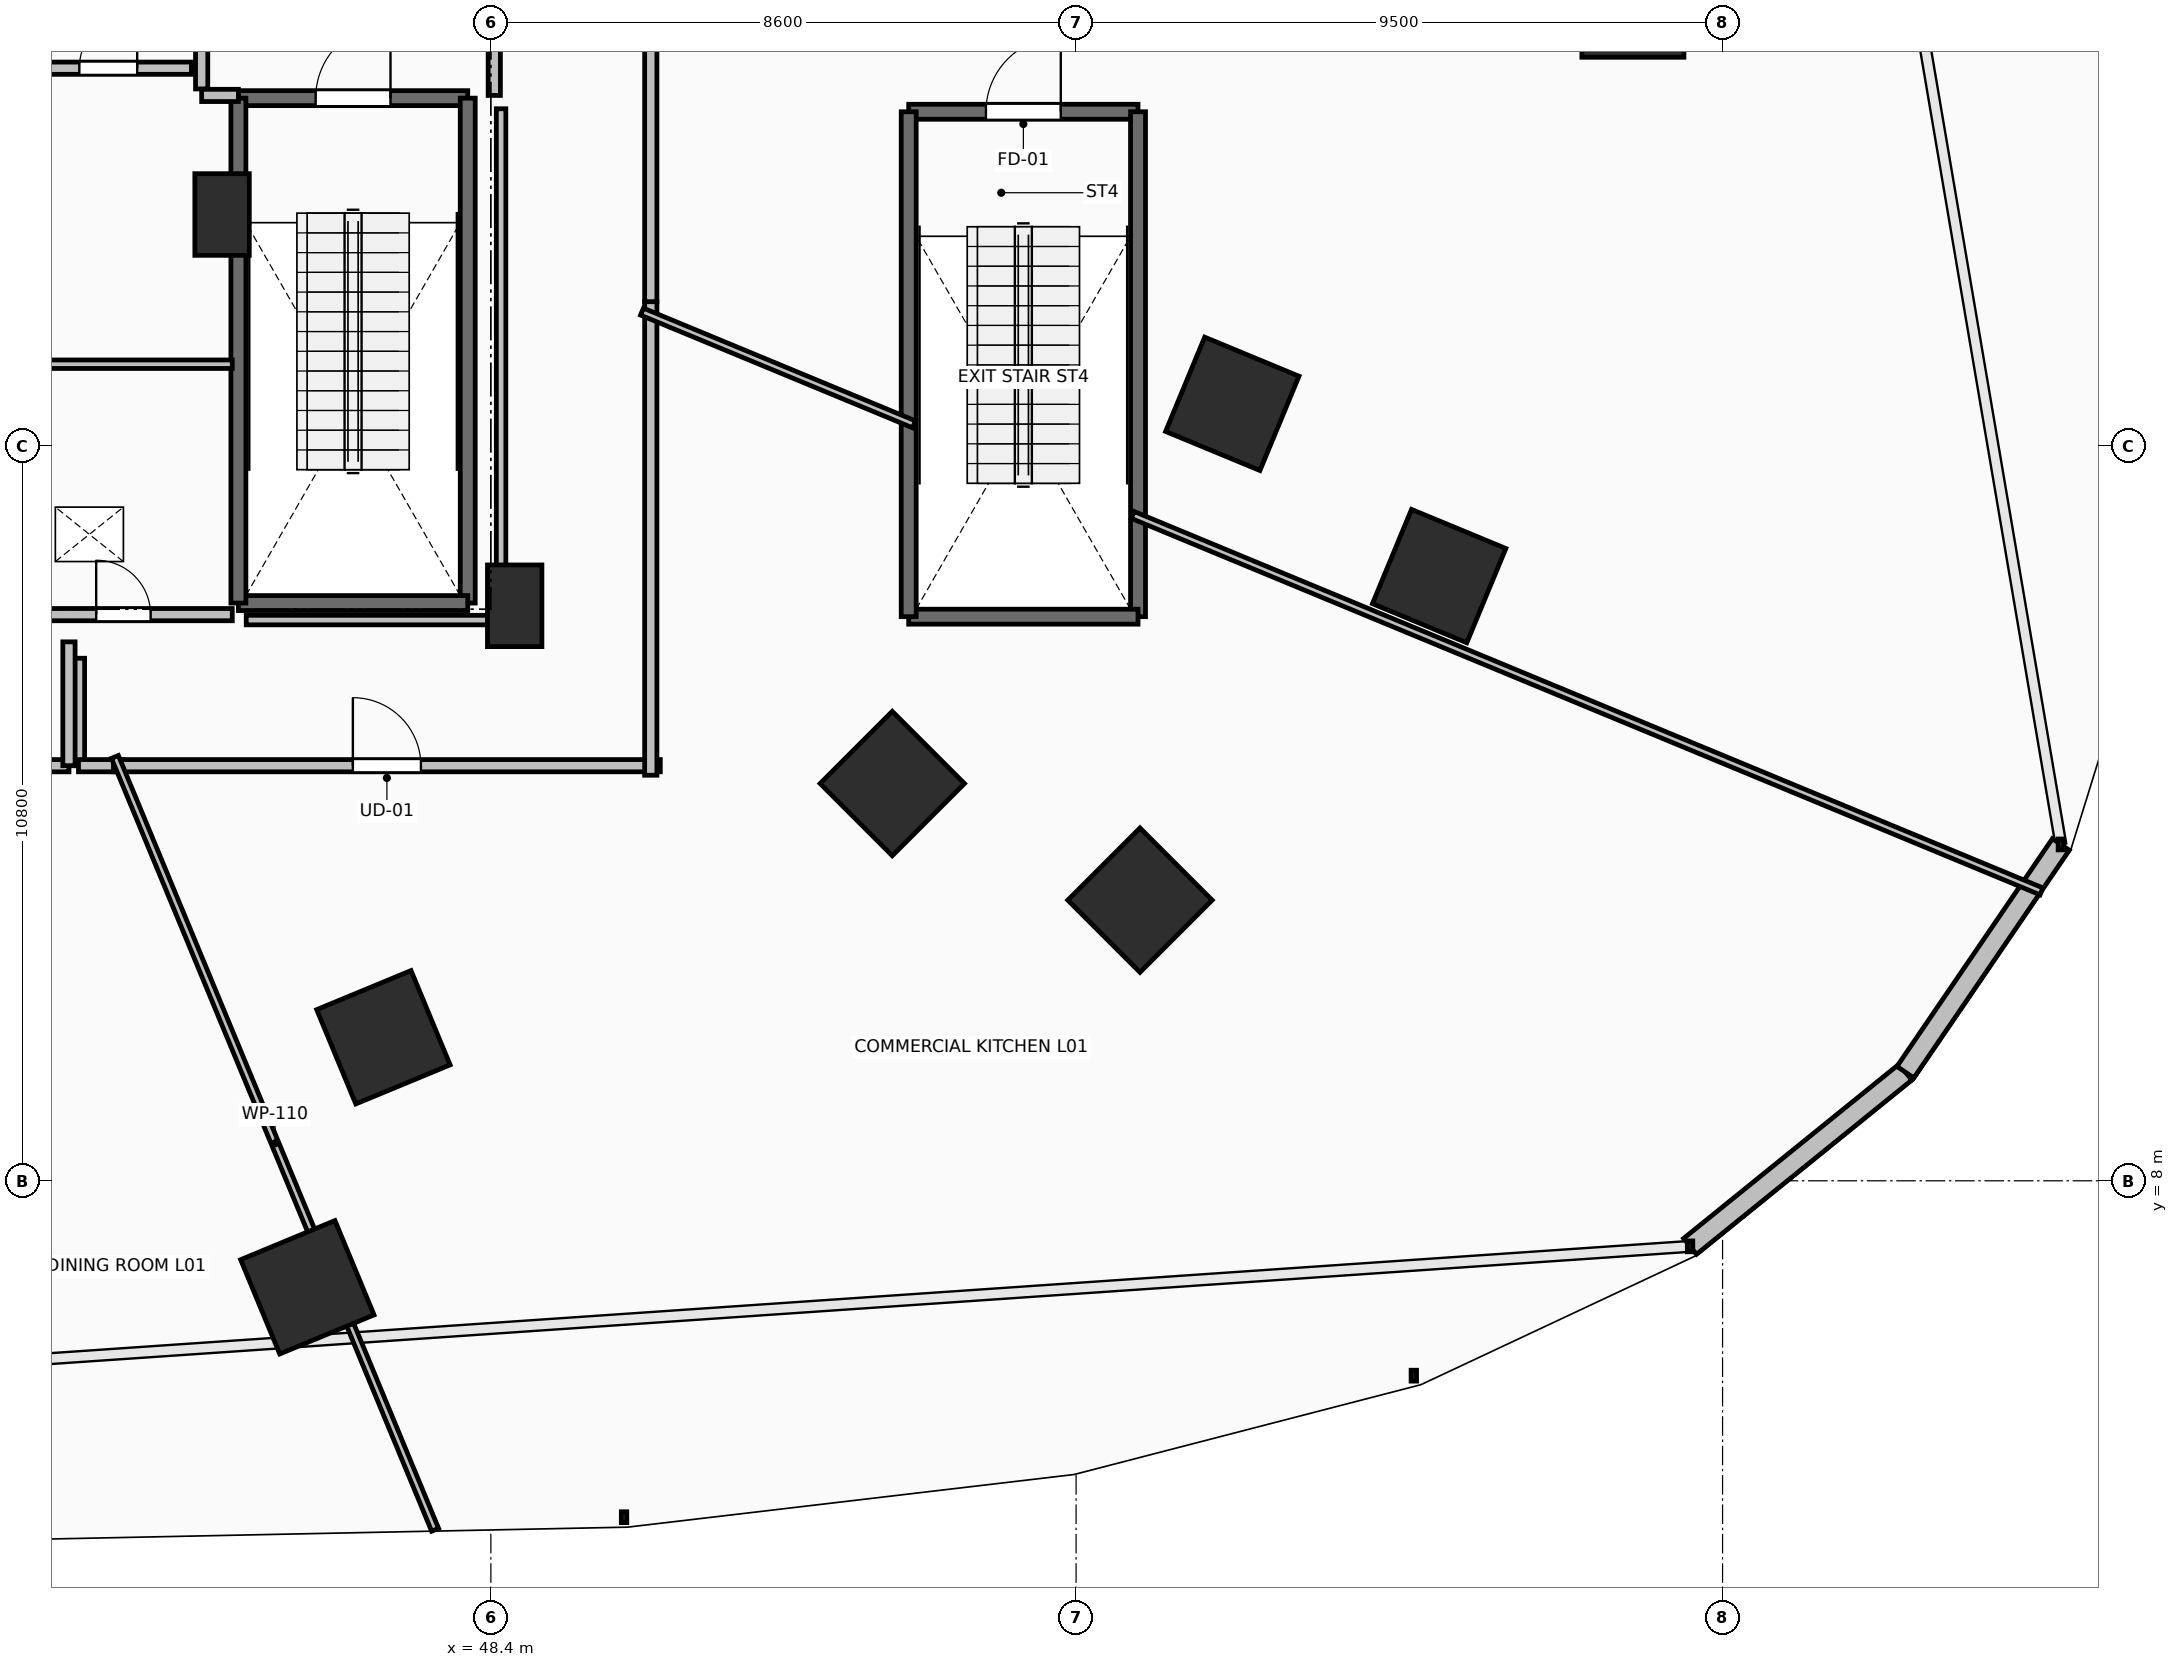
"""IFC4 building model, lengths in metres.
Left out: names, types, materials, properties, quantities, classifications, styles, units other than length and angle.
Written with IfcOpenShell. Run it as: python <this file> out.ifc"""

import sys

from ifc_helpers import new_model, si_unit, direction, frame, frame_2d, origin, origin_2d, place, context, subcontext, project, spatial, rectangle, extrude, element, fill, save


model = new_model("IFC4")
c1 = context("Model", 3, precision=1e-05, world=origin(), true_north=direction((0.0, 1.0)))
c2 = subcontext(c1, "Body", "Model", "MODEL_VIEW")
j1 = project(units=[si_unit("LENGTHUNIT", "METRE"), si_unit("PLANEANGLEUNIT", "RADIAN")], contexts=[c1])
p1 = place(None, origin())
s1 = spatial("IfcSite", under=j1, at=p1, CompositionType="ELEMENT")
p2 = place(p1, origin())
s2 = spatial("IfcBuilding", under=s1, at=p2, CompositionType="ELEMENT")
p3 = place(p2, frame((0.0, 0.0, 4.8)))
s3 = spatial("IfcBuildingStorey", under=s2, at=p3, CompositionType="ELEMENT", Elevation=4.8)
for number, where, z_axis, x_axis in (
    (1, (46.821, 10.109, 0.0), (0.0, 0.0, 1.0), (0.383, -0.924, 0.0)),
    (2, (54.299, 13.838, 0.0), (0.0, 0.0, 1.0), (0.707, -0.707, 0.0)),
    (3, (59.295, 19.418, 0.0), (0.0, 0.0, 1.0), (0.924, -0.383, 0.0)),
    (4, (65.182, 25.261, 0.0), (0.0, 0.0, 1.0), (1.0, 0.0, 0.0)),
    (5, (45.703, 6.435, 0.0), (0.0, 0.0, 1.0), (0.383, -0.924, 0.0)),
    (6, (57.939, 12.124, 0.0), (0.0, 0.0, 1.0), (0.707, -0.707, 0.0)),
    (7, (62.335, 16.886, 0.0), (0.0, 0.0, 1.0), (0.924, -0.383, 0.0)),
):
    element("IfcColumn", number, at=place(p3, frame(where, z_axis=z_axis, x_axis=x_axis)), inside=s3, PredefinedType="COLUMN", context=c2, shape_type="SweptSolid", body=[
        extrude(rectangle(XDim=1.5, YDim=1.5, at=origin_2d()), origin(), (0.0, 0.0, 1.0), 4.8),
    ])
for number, where, z_axis, x_axis in (
    (8, (48.75, 16.45, 0.0), (0.0, 0.0, 1.0), (1.0, 0.0, 0.0)),
    (9, (44.45, 22.2, 0.0), (0.0, 0.0, 1.0), (1.0, 0.0, 0.0)),
):
    element("IfcColumn", number, at=place(p3, frame(where, z_axis=z_axis, x_axis=x_axis)), inside=s3, PredefinedType="PILASTER", context=c2, shape_type="SweptSolid", body=[
        extrude(rectangle(XDim=0.8, YDim=1.2, at=origin_2d()), origin(), (0.0, 0.0, 1.0), 4.8),
    ])
p4 = place(p3, frame((66.022, 7.037, 0.0), z_axis=(0.0, 0.0, 1.0), x_axis=(0.777457154615, 0.628935905111, 0.0)))
e10 = element("IfcWall", 10, at=p4, inside=s3, PredefinedType="STANDARD", context=c2, shape_type="SweptSolid", body=[
    extrude(rectangle(XDim=4.07, YDim=0.3, at=frame_2d((2.035, 0.0))), origin(), (0.0, 0.0, 1.0), 4.48),
])
p5 = place(p3, frame((69.187, 9.596, 0.0), z_axis=(0.0, 0.0, 1.0), x_axis=(0.563802284854, 0.825909791438, 0.0)))
e11 = element("IfcWall", 11, at=p5, inside=s3, PredefinedType="STANDARD", context=c2, shape_type="SweptSolid", body=[
    extrude(rectangle(XDim=4.052, YDim=0.3, at=frame_2d((2.026, 0.0))), origin(), (0.0, 0.0, 1.0), 4.48),
])
p6 = place(p3, frame((44.69, 23.91, 0.0), z_axis=(0.0, 0.0, 1.0), x_axis=(1.0, 0.0, 0.0)))
e12 = element("IfcWall", 12, at=p6, inside=s3, PredefinedType="SOLIDWALL", context=c2, shape_type="SweptSolid", body=[
    extrude(rectangle(XDim=3.37, YDim=0.22, at=frame_2d((1.685, 0.0))), origin(), (0.0, 0.0, 1.0), 4.48),
])
p7 = place(p6, frame((1.135, 0.0, 0.0)))
e13 = element("IfcOpeningElement", 13, at=p7, cuts=e12, PredefinedType="OPENING", context=c2, shape_type="SweptSolid", body=[
    extrude(rectangle(XDim=1.1, YDim=2.15, at=frame_2d((0.55, 1.075))), frame((0.0, 0.125, 0.0), z_axis=(0.0, -1.0, 0.0), x_axis=(1.0, 0.0, 0.0)), (0.0, 0.0, 1.0), 0.25),
])
p8 = place(p3, frame((48.06, 23.91, 0.0), z_axis=(0.0, 0.0, 1.0), x_axis=(0.0, -1.0, 0.0)))
e14 = element("IfcWall", 14, at=p8, inside=s3, PredefinedType="SOLIDWALL", context=c2, shape_type="SweptSolid", body=[
    extrude(rectangle(XDim=7.42, YDim=0.22, at=frame_2d((3.71, 0.0))), origin(), (0.0, 0.0, 1.0), 4.48),
])
p9 = place(p3, frame((48.06, 16.49, 0.0), z_axis=(0.0, 0.0, 1.0), x_axis=(-1.0, 0.0, 0.0)))
e15 = element("IfcWall", 15, at=p9, inside=s3, PredefinedType="SOLIDWALL", context=c2, shape_type="SweptSolid", body=[
    extrude(rectangle(XDim=3.37, YDim=0.22, at=frame_2d((1.685, 0.0))), origin(), (0.0, 0.0, 1.0), 4.48),
])
p10 = place(p3, frame((44.69, 16.49, 0.0), z_axis=(0.0, 0.0, 1.0), x_axis=(0.0, 1.0, 0.0)))
e16 = element("IfcWall", 16, at=p10, inside=s3, PredefinedType="SOLIDWALL", context=c2, shape_type="SweptSolid", body=[
    extrude(rectangle(XDim=7.42, YDim=0.22, at=frame_2d((3.71, 0.0))), origin(), (0.0, 0.0, 1.0), 4.48),
])
p11 = place(p3, frame((54.54, 23.71, 0.0), z_axis=(0.0, 0.0, 1.0), x_axis=(1.0, 0.0, 0.0)))
e17 = element("IfcWall", 17, at=p11, inside=s3, PredefinedType="SOLIDWALL", context=c2, shape_type="SweptSolid", body=[
    extrude(rectangle(XDim=3.37, YDim=0.22, at=frame_2d((1.685, 0.0))), origin(), (0.0, 0.0, 1.0), 4.48),
])
p12 = place(p11, frame((1.135, 0.0, 0.0)))
e18 = element("IfcOpeningElement", 18, at=p12, cuts=e17, PredefinedType="OPENING", context=c2, shape_type="SweptSolid", body=[
    extrude(rectangle(XDim=1.1, YDim=2.15, at=frame_2d((0.55, 1.075))), frame((0.0, 0.125, 0.0), z_axis=(0.0, -1.0, 0.0), x_axis=(1.0, 0.0, 0.0)), (0.0, 0.0, 1.0), 0.25),
])
p13 = place(p3, frame((57.91, 23.71, 0.0), z_axis=(0.0, 0.0, 1.0), x_axis=(0.0, -1.0, 0.0)))
e19 = element("IfcWall", 19, at=p13, inside=s3, PredefinedType="SOLIDWALL", context=c2, shape_type="SweptSolid", body=[
    extrude(rectangle(XDim=7.42, YDim=0.22, at=frame_2d((3.71, 0.0))), origin(), (0.0, 0.0, 1.0), 4.48),
])
p14 = place(p3, frame((57.91, 16.29, 0.0), z_axis=(0.0, 0.0, 1.0), x_axis=(-1.0, 0.0, 0.0)))
e20 = element("IfcWall", 20, at=p14, inside=s3, PredefinedType="SOLIDWALL", context=c2, shape_type="SweptSolid", body=[
    extrude(rectangle(XDim=3.37, YDim=0.22, at=frame_2d((1.685, 0.0))), origin(), (0.0, 0.0, 1.0), 4.48),
])
p15 = place(p3, frame((54.54, 16.29, 0.0), z_axis=(0.0, 0.0, 1.0), x_axis=(0.0, 1.0, 0.0)))
e21 = element("IfcWall", 21, at=p15, inside=s3, PredefinedType="SOLIDWALL", context=c2, shape_type="SweptSolid", body=[
    extrude(rectangle(XDim=7.42, YDim=0.22, at=frame_2d((3.71, 0.0))), origin(), (0.0, 0.0, 1.0), 4.48),
])
p16 = place(p3, frame((44.15, 27.955, 0.0), z_axis=(0.0, 0.0, 1.0), x_axis=(0.0, -1.0, 0.0)))
e22 = element("IfcWall", 22, at=p16, inside=s3, PredefinedType="PARTITIONING", context=c2, shape_type="SweptSolid", body=[
    extrude(rectangle(XDim=3.91, YDim=0.18, at=frame_2d((1.955, 0.0))), origin(), (0.0, 0.0, 1.0), 4.48),
])
p17 = place(p16, frame((1.355, 0.0, 0.0)))
e23 = element("IfcOpeningElement", 23, at=p17, cuts=e22, PredefinedType="OPENING", context=c2, shape_type="SweptSolid", body=[
    extrude(rectangle(XDim=1.2, YDim=2.15, at=frame_2d((0.6, 1.075))), frame((0.0, 0.105, 0.0), z_axis=(0.0, -1.0, 0.0), x_axis=(1.0, 0.0, 0.0)), (0.0, 0.0, 1.0), 0.21),
])
p18 = place(p3, frame((44.15, 23.95, 0.0), z_axis=(0.0, 0.0, 1.0), x_axis=(1.0, 0.0, 0.0)))
e24 = element("IfcWall", 24, at=p18, inside=s3, PredefinedType="PARTITIONING", context=c2, shape_type="SweptSolid", body=[
    extrude(rectangle(XDim=0.54, YDim=0.18, at=frame_2d((0.27, 0.0))), origin(), (0.0, 0.0, 1.0), 4.48),
])
p19 = place(p3, frame((48.45, 23.95, 0.0), z_axis=(0.0, 0.0, 1.0), x_axis=(0.0, 1.0, 0.0)))
e25 = element("IfcWall", 25, at=p19, inside=s3, PredefinedType="PARTITIONING", context=c2, shape_type="SweptSolid", body=[
    extrude(rectangle(XDim=4.05, YDim=0.18, at=frame_2d((2.025, 0.0))), origin(), (0.0, 0.0, 1.0), 4.48),
])
p20 = place(p19, frame((1.425, 0.0, 0.0)))
e26 = element("IfcOpeningElement", 26, at=p20, cuts=e25, PredefinedType="OPENING", context=c2, shape_type="SweptSolid", body=[
    extrude(rectangle(XDim=1.2, YDim=2.15, at=frame_2d((0.6, 1.075))), frame((0.0, 0.105, 0.0), z_axis=(0.0, -1.0, 0.0), x_axis=(1.0, 0.0, 0.0)), (0.0, 0.0, 1.0), 0.21),
])
p21 = place(p3, frame((41.555, 24.35, 0.0), z_axis=(0.0, 0.0, 1.0), x_axis=(1.0, 0.0, 0.0)))
e27 = element("IfcWall", 27, at=p21, inside=s3, PredefinedType="PARTITIONING", context=c2, shape_type="SweptSolid", body=[
    extrude(rectangle(XDim=2.445, YDim=0.18, at=frame_2d((1.223, 0.0))), origin(), (0.0, 0.0, 1.0), 4.48),
])
p22 = place(p21, frame((0.798, 0.0, 0.0)))
e28 = element("IfcOpeningElement", 28, at=p22, cuts=e27, PredefinedType="OPENING", context=c2, shape_type="SweptSolid", body=[
    extrude(rectangle(XDim=0.85, YDim=2.1, at=frame_2d((0.425, 1.05))), frame((0.0, 0.105, 0.0), z_axis=(0.0, -1.0, 0.0), x_axis=(1.0, 0.0, 0.0)), (0.0, 0.0, 1.0), 0.21),
])
p23 = place(p3, frame((44.6, 20.0, 0.0), z_axis=(0.0, 0.0, 1.0), x_axis=(-1.0, 0.0, 0.0)))
e29 = element("IfcWall", 29, at=p23, inside=s3, PredefinedType="PARTITIONING", context=c2, shape_type="SweptSolid", body=[
    extrude(rectangle(XDim=3.2, YDim=0.125, at=frame_2d((1.6, 0.0))), origin(), (0.0, 0.0, 1.0), 4.48),
])
p24 = place(p3, frame((41.4, 16.32, 0.0), z_axis=(0.0, 0.0, 1.0), x_axis=(1.0, 0.0, 0.0)))
e30 = element("IfcWall", 30, at=p24, inside=s3, PredefinedType="PARTITIONING", context=c2, shape_type="SweptSolid", body=[
    extrude(rectangle(XDim=3.2, YDim=0.18, at=frame_2d((1.6, 0.0))), origin(), (0.0, 0.0, 1.0), 4.48),
])
p25 = place(p24, frame((1.2, 0.0, 0.0)))
e31 = element("IfcOpeningElement", 31, at=p25, cuts=e30, PredefinedType="OPENING", context=c2, shape_type="SweptSolid", body=[
    extrude(rectangle(XDim=0.8, YDim=2.05, at=frame_2d((0.4, 1.025))), frame((0.0, 0.105, 0.0), z_axis=(0.0, -1.0, 0.0), x_axis=(1.0, 0.0, 0.0)), (0.0, 0.0, 1.0), 0.21),
])
p26 = place(p3, frame((42.34, 15.679, 0.0), z_axis=(0.0, 0.0, 1.0), x_axis=(0.0, -1.0, 0.0)))
e32 = element("IfcWall", 32, at=p26, inside=s3, PredefinedType="PARTITIONING", context=c2, shape_type="SweptSolid", body=[
    extrude(rectangle(XDim=1.579, YDim=0.18, at=frame_2d((0.79, 0.0))), origin(), (0.0, 0.0, 1.0), 4.48),
])
p27 = place(p3, frame((42.34, 14.1, 0.0), z_axis=(0.0, 0.0, 1.0), x_axis=(1.0, 0.0, 0.0)))
e33 = element("IfcWall", 33, at=p27, inside=s3, PredefinedType="PARTITIONING", context=c2, shape_type="SweptSolid", body=[
    extrude(rectangle(XDim=0.654, YDim=0.18, at=frame_2d((0.327, 0.0))), origin(), (0.0, 0.0, 1.0), 4.48),
])
p28 = place(p3, frame((38.06, 14.1, 0.0), z_axis=(0.0, 0.0, 1.0), x_axis=(1.0, 0.0, 0.0)))
e34 = element("IfcWall", 34, at=p28, inside=s3, PredefinedType="PARTITIONING", context=c2, shape_type="SweptSolid", body=[
    extrude(rectangle(XDim=4.14, YDim=0.18, at=frame_2d((2.07, 0.0))), origin(), (0.0, 0.0, 1.0), 4.48),
])
p29 = place(p28, frame((1.57, 0.0, 0.0)))
e35 = element("IfcOpeningElement", 35, at=p29, cuts=e34, PredefinedType="OPENING", context=c2, shape_type="SweptSolid", body=[
    extrude(rectangle(XDim=1.0, YDim=2.15, at=frame_2d((0.5, 1.075))), frame((0.0, 0.105, 0.0), z_axis=(0.0, -1.0, 0.0), x_axis=(1.0, 0.0, 0.0)), (0.0, 0.0, 1.0), 0.21),
])
p30 = place(p3, frame((42.2, 14.1, 0.0), z_axis=(0.0, 0.0, 1.0), x_axis=(0.0, 1.0, 0.0)))
e36 = element("IfcWall", 36, at=p30, inside=s3, PredefinedType="PARTITIONING", context=c2, shape_type="SweptSolid", body=[
    extrude(rectangle(XDim=1.82, YDim=0.18, at=frame_2d((0.91, 0.0))), origin(), (0.0, 0.0, 1.0), 4.48),
])
p31 = place(p3, frame((42.854, 14.1, 0.0), z_axis=(0.0, 0.0, 1.0), x_axis=(1.0, 0.0, 0.0)))
e37 = element("IfcWall", 37, at=p31, inside=s3, PredefinedType="PARTITIONING", context=c2, shape_type="SweptSolid", body=[
    extrude(rectangle(XDim=8.036, YDim=0.18, at=frame_2d((4.018, 0.0))), origin(), (0.0, 0.0, 1.0), 3.672),
])
p32 = place(p31, frame((3.518, 0.0, 0.0)))
e38 = element("IfcOpeningElement", 38, at=p32, cuts=e37, PredefinedType="OPENING", context=c2, shape_type="SweptSolid", body=[
    extrude(rectangle(XDim=1.0, YDim=2.15, at=frame_2d((0.5, 1.075))), frame((0.0, 0.105, 0.0), z_axis=(0.0, -1.0, 0.0), x_axis=(1.0, 0.0, 0.0)), (0.0, 0.0, 1.0), 0.21),
])
p33 = place(p3, frame((50.75, 13.96, 0.0), z_axis=(0.0, 0.0, 1.0), x_axis=(0.0, 1.0, 0.0)))
e39 = element("IfcWall", 39, at=p33, inside=s3, PredefinedType="PARTITIONING", context=c2, shape_type="SweptSolid", body=[
    extrude(rectangle(XDim=6.959, YDim=0.18, at=frame_2d((3.479, 0.0))), origin(), (0.0, 0.0, 1.0), 3.672),
])
p34 = place(p3, frame((50.75, 20.919, 0.0), z_axis=(0.0, 0.0, 1.0), x_axis=(0.0, 1.0, 0.0)))
e40 = element("IfcWall", 40, at=p34, inside=s3, PredefinedType="PARTITIONING", context=c2, shape_type="SweptSolid", body=[
    extrude(rectangle(XDim=10.302, YDim=0.18, at=frame_2d((5.151, 0.0))), origin(), (0.0, 0.0, 1.0), 3.672),
])
p35 = place(p34, frame((4.651, 0.0, 0.0)))
e41 = element("IfcOpeningElement", 41, at=p35, cuts=e40, PredefinedType="OPENING", context=c2, shape_type="SweptSolid", body=[
    extrude(rectangle(XDim=1.0, YDim=2.15, at=frame_2d((0.5, 1.075))), frame((0.0, 0.105, 0.0), z_axis=(0.0, -1.0, 0.0), x_axis=(1.0, 0.0, 0.0)), (0.0, 0.0, 1.0), 0.21),
])
p36 = place(p3, frame((47.581, 2.872, 0.0), z_axis=(0.0, 0.0, 1.0), x_axis=(-0.382723619964, 0.923862885239, 0.0)))
e42 = element("IfcWall", 42, at=p36, inside=s3, PredefinedType="PARTITIONING", context=c2, shape_type="SweptSolid", body=[
    extrude(rectangle(XDim=12.294, YDim=0.11, at=frame_2d((6.147, 0.0))), origin(), (0.0, 0.0, 1.0), 3.672),
])
p37 = place(p3, frame((54.619, 19.116, 0.0), z_axis=(0.0, 0.0, 1.0), x_axis=(-0.923887587975, 0.382663984176, 0.0)))
e43 = element("IfcWall", 43, at=p37, inside=s3, PredefinedType="PARTITIONING", context=c2, shape_type="SweptSolid", body=[
    extrude(rectangle(XDim=4.328, YDim=0.11, at=frame_2d((2.164, 0.0))), origin(), (0.0, 0.0, 1.0), 4.48),
])
p38 = place(p3, frame((71.186, 12.253, 0.0), z_axis=(0.0, 0.0, 1.0), x_axis=(-0.92387438968, 0.382695848021, 0.0)))
e44 = element("IfcWall", 44, at=p38, inside=s3, PredefinedType="PARTITIONING", context=c2, shape_type="SweptSolid", body=[
    extrude(rectangle(XDim=14.456, YDim=0.11, at=frame_2d((7.228, 0.0))), origin(), (0.0, 0.0, 1.0), 3.769),
])
p39 = place(p3, frame((48.55, 23.754, 0.0), z_axis=(0.0, 0.0, 1.0), x_axis=(0.0, -1.0, 0.0)))
e45 = element("IfcWall", 45, at=p39, inside=s3, PredefinedType="PARTITIONING", context=c2, shape_type="SweptSolid", body=[
    extrude(rectangle(XDim=7.514, YDim=0.14, at=frame_2d((3.757, 0.0))), origin(), (0.0, 0.0, 1.0), 2.406),
])
p40 = place(p3, frame((48.55, 16.24, 0.0), z_axis=(0.0, 0.0, 1.0), x_axis=(-1.0, 0.0, 0.0)))
e46 = element("IfcWall", 46, at=p40, inside=s3, PredefinedType="PARTITIONING", context=c2, shape_type="SweptSolid", body=[
    extrude(rectangle(XDim=3.745, YDim=0.14, at=frame_2d((1.873, 0.0))), origin(), (0.0, 0.0, 1.0), 3.672),
])
p41 = place(p7, origin())
e47 = element("IfcDoor", 47, at=p41, inside=s3, OperationType="SINGLE_SWING_RIGHT", PredefinedType="DOOR", context=c2, shape_type="SweptSolid", body=[
    extrude(rectangle(XDim=1.1, YDim=2.15, at=frame_2d((0.55, 1.075))), frame((0.0, 0.025, 0.0), z_axis=(0.0, -1.0, 0.0), x_axis=(1.0, 0.0, 0.0)), (0.0, 0.0, 1.0), 0.05),
])
fill(e13, e47)
p42 = place(p12, origin())
e48 = element("IfcDoor", 48, at=p42, inside=s3, OperationType="SINGLE_SWING_RIGHT", PredefinedType="DOOR", context=c2, shape_type="SweptSolid", body=[
    extrude(rectangle(XDim=1.1, YDim=2.15, at=frame_2d((0.55, 1.075))), frame((0.0, 0.025, 0.0), z_axis=(0.0, -1.0, 0.0), x_axis=(1.0, 0.0, 0.0)), (0.0, 0.0, 1.0), 0.05),
])
fill(e18, e48)
p43 = place(p22, origin())
e49 = element("IfcDoor", 49, at=p43, inside=s3, OperationType="SINGLE_SWING_RIGHT", PredefinedType="DOOR", context=c2, shape_type="SweptSolid", body=[
    extrude(rectangle(XDim=0.85, YDim=2.1, at=frame_2d((0.425, 1.05))), frame((0.0, 0.025, 0.0), z_axis=(0.0, -1.0, 0.0), x_axis=(1.0, 0.0, 0.0)), (0.0, 0.0, 1.0), 0.05),
])
fill(e28, e49)
p44 = place(p25, origin())
e50 = element("IfcDoor", 50, at=p44, inside=s3, OperationType="SINGLE_SWING_LEFT", PredefinedType="DOOR", context=c2, shape_type="SweptSolid", body=[
    extrude(rectangle(XDim=0.8, YDim=2.05, at=frame_2d((0.4, 1.025))), frame((0.0, 0.025, 0.0), z_axis=(0.0, -1.0, 0.0), x_axis=(1.0, 0.0, 0.0)), (0.0, 0.0, 1.0), 0.05),
])
fill(e31, e50)
p45 = place(p32, origin())
e51 = element("IfcDoor", 51, at=p45, inside=s3, OperationType="SINGLE_SWING_LEFT", PredefinedType="DOOR", context=c2, shape_type="SweptSolid", body=[
    extrude(rectangle(XDim=1.0, YDim=2.15, at=frame_2d((0.5, 1.075))), frame((0.0, 0.025, 0.0), z_axis=(0.0, -1.0, 0.0), x_axis=(1.0, 0.0, 0.0)), (0.0, 0.0, 1.0), 0.05),
])
fill(e38, e51)
save(model, sys.argv[1])
